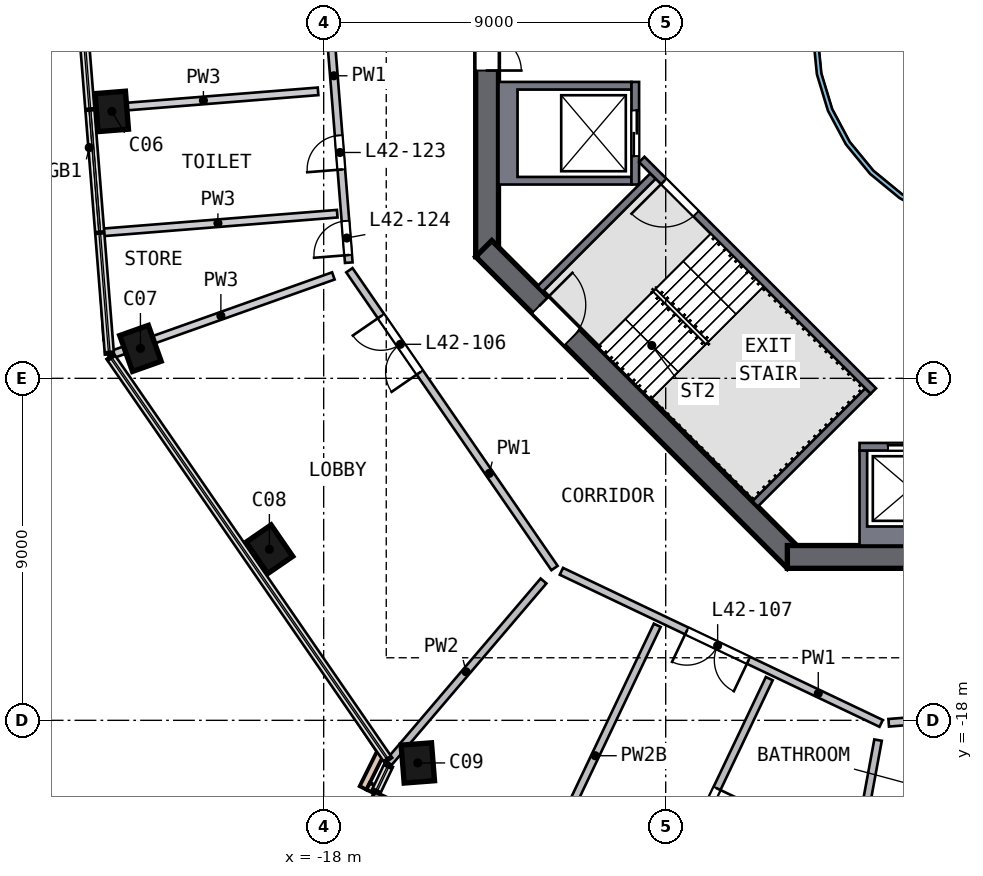
"""IFC4 building model, lengths in metres.
Left out: names, types, materials, properties, quantities, classifications, styles, units other than length and angle.
Written with IfcOpenShell. Run it as: python <this file> out.ifc"""

import sys

from ifc_helpers import new_model, si_unit, direction, frame, frame_2d, origin, origin_2d, place, context, subcontext, project, spatial, polyline, rectangle, outline, extrude, element, fill, save


model = new_model("IFC4")
c1 = context("Model", 3, precision=1e-05, world=origin(), true_north=direction((0.0, 1.0)))
c2 = subcontext(c1, "Body", "Model", "MODEL_VIEW")
j1 = project(units=[si_unit("LENGTHUNIT", "METRE"), si_unit("PLANEANGLEUNIT", "RADIAN")], contexts=[c1])
p1 = place(None, origin())
s1 = spatial("IfcSite", under=j1, at=p1, CompositionType="ELEMENT")
p2 = place(p1, origin())
s2 = spatial("IfcBuilding", under=s1, at=p2, CompositionType="ELEMENT")
p3 = place(p2, frame((0.0, 0.0, 175.0)))
s3 = spatial("IfcBuildingStorey", under=s2, at=p3, CompositionType="ELEMENT", Elevation=175.0)
p4 = place(p3, frame((-23.583, -1.881, 0.0), z_axis=(0.006953716, -0.078722297, 0.996872332), x_axis=(0.079340262, -0.993710224, -0.079026028)))
e1 = element("IfcColumn", 1, at=p4, inside=s3, PredefinedType="COLUMN", context=c2, shape_type="SweptSolid", body=[
    extrude(rectangle(XDim=1.0, YDim=0.8, at=origin_2d()), origin(), (0.0, 0.0, 1.0), 4.705),
])
p5 = place(p3, frame((-22.855, -8.12, 0.0), z_axis=(0.027706677, -0.076115534, 0.996713984), x_axis=(-0.333017196, 0.93943535, 0.080998586)))
e2 = element("IfcColumn", 2, at=p5, inside=s3, PredefinedType="COLUMN", context=c2, shape_type="SweptSolid", body=[
    extrude(rectangle(XDim=1.0, YDim=0.8, at=origin_2d()), origin(), (0.0, 0.0, 1.0), 4.705),
])
p6 = place(p3, frame((-19.483, -13.421, 0.0), z_axis=(0.045354859, -0.064711109, 0.996872815), x_axis=(0.565250312, -0.821126017, -0.079019933)))
e3 = element("IfcColumn", 3, at=p6, inside=s3, PredefinedType="COLUMN", context=c2, shape_type="SweptSolid", body=[
    extrude(rectangle(XDim=1.0, YDim=0.8, at=origin_2d()), origin(), (0.0, 0.0, 1.0), 4.705),
])
p7 = place(p3, frame((-15.6, -19.059, 0.0), z_axis=(0.064071621, -0.051568576, 0.996612015), x_axis=(-0.075850249, 0.995523512, 0.056388622)))
e4 = element("IfcColumn", 4, at=p7, inside=s3, PredefinedType="COLUMN", context=c2, shape_type="SweptSolid", body=[
    extrude(rectangle(XDim=1.0, YDim=0.8, at=origin_2d()), origin(), (0.0, 0.0, 1.0), 4.706),
])
p8 = place(p3, frame((-13.7, 5.799, 0.0), z_axis=(0.0, 0.0, 1.0), x_axis=(0.0, -1.0, 0.0)))
e5 = element("IfcWall", 5, at=p8, inside=s3, PredefinedType="SHEAR", context=c2, shape_type="SweptSolid", body=[
    extrude(rectangle(XDim=11.598, YDim=0.6, at=frame_2d((5.799, 0.0))), origin(), (0.0, 0.0, 1.0), 5.0),
])
p9 = place(p8, frame((4.899, 0.0, 0.0)))
e6 = element("IfcOpeningElement", 6, at=p9, cuts=e5, PredefinedType="OPENING", context=c2, shape_type="SweptSolid", body=[
    extrude(rectangle(XDim=1.8, YDim=2.1, at=frame_2d((0.9, 1.05))), frame((0.0, 0.31, 0.0), z_axis=(0.0, -1.0, 0.0), x_axis=(1.0, 0.0, 0.0)), (0.0, 0.0, 1.0), 0.62),
])
p10 = place(p3, frame((-13.788, -5.587, 0.0), z_axis=(0.0, 0.0, 1.0), x_axis=(0.707106781, -0.707106781, 0.0)))
e7 = element("IfcWall", 7, at=p10, inside=s3, PredefinedType="SHEAR", context=c2, shape_type="SweptSolid", body=[
    extrude(rectangle(XDim=11.598, YDim=0.6, at=frame_2d((5.799, 0.0))), origin(), (0.0, 0.0, 1.0), 5.0),
])
p11 = place(p10, frame((2.099, 0.0, 0.0)))
e8 = element("IfcOpeningElement", 8, at=p11, cuts=e7, PredefinedType="OPENING", context=c2, shape_type="SweptSolid", body=[
    extrude(rectangle(XDim=1.2, YDim=2.1, at=frame_2d((0.6, 1.05))), frame((0.0, 0.31, 0.0), z_axis=(0.0, -1.0, 0.0), x_axis=(1.0, 0.0, 0.0)), (0.0, 0.0, 1.0), 0.62),
])
p12 = place(p3, frame((-5.799, -13.7, 0.0), z_axis=(0.0, 0.0, 1.0), x_axis=(1.0, 0.0, 0.0)))
e9 = element("IfcWall", 9, at=p12, inside=s3, PredefinedType="SHEAR", context=c2, shape_type="SweptSolid", body=[
    extrude(rectangle(XDim=11.598, YDim=0.6, at=frame_2d((5.799, 0.0))), origin(), (0.0, 0.0, 1.0), 5.0),
])
p13 = place(p12, frame((4.899, 0.0, 0.0)))
e10 = element("IfcOpeningElement", 10, at=p13, cuts=e9, PredefinedType="OPENING", context=c2, shape_type="SweptSolid", body=[
    extrude(rectangle(XDim=1.8, YDim=2.1, at=frame_2d((0.9, 1.05))), frame((0.0, 0.31, 0.0), z_axis=(0.0, -1.0, 0.0), x_axis=(1.0, 0.0, 0.0)), (0.0, 0.0, 1.0), 0.62),
])
p14 = place(p3, frame((-16.688, -19.949, 0.0), z_axis=(0.0, 0.0, 1.0), x_axis=(0.903055362, -0.42952417, 0.0)))
e11 = element("IfcWall", 11, at=p14, inside=s3, PredefinedType="SOLIDWALL", context=c2, shape_type="SweptSolid", body=[
    extrude(rectangle(XDim=1.875, YDim=0.15, at=frame_2d((0.938, 0.0))), origin(), (0.0, 0.0, 1.0), 4.69),
])
p15 = place(p3, frame((-16.497, -18.838, 0.0), z_axis=(0.0, 0.0, 1.0), x_axis=(-0.444699929, -0.895679615, 0.0)))
e12 = element("IfcWall", 12, at=p15, inside=s3, PredefinedType="PARAPET", context=c2, shape_type="SweptSolid", body=[
    extrude(rectangle(XDim=1.05, YDim=0.2, at=frame_2d((0.525, 0.0))), origin(), (0.0, 0.0, 1.0), 1.1),
])
p16 = place(p3, frame((-16.829, -19.733, 0.0), z_axis=(0.0, 0.0, 1.0), x_axis=(0.895756847, -0.444544341, 0.0)))
e13 = element("IfcWall", 13, at=p16, inside=s3, PredefinedType="PARAPET", context=c2, shape_type="SweptSolid", body=[
    extrude(rectangle(XDim=0.22, YDim=0.2, at=frame_2d((0.11, 0.0))), origin(), (0.0, 0.0, 1.0), 1.1),
])
p17 = place(p3, origin())
e14 = element("IfcWall", 14, at=p17, inside=s3, PredefinedType="SOLIDWALL", context=c2, shape_type="SweptSolid", body=[
    extrude(outline(polyline([(-13.4, -3.9), (-13.4, -1.2), (-9.9, -1.2), (-9.9, -1.4), (-12.9, -1.4), (-12.9, -3.7), (-9.9, -3.7), (-9.9, -3.9), (-13.4, -3.9)])), origin(), (0.0, 0.0, 1.0), 4.69),
])
p18 = place(p3, frame((-9.8, -1.2, 0.0), z_axis=(0.0, 0.0, 1.0), x_axis=(0.0, -1.0, 0.0)))
e15 = element("IfcWall", 15, at=p18, inside=s3, PredefinedType="SOLIDWALL", context=c2, shape_type="SweptSolid", body=[
    extrude(rectangle(XDim=2.7, YDim=0.2, at=frame_2d((1.35, 0.0))), origin(), (0.0, 0.0, 1.0), 4.69),
])
p19 = place(p18, frame((0.75, 0.0, 0.0)))
e16 = element("IfcOpeningElement", 16, at=p19, cuts=e15, PredefinedType="OPENING", context=c2, shape_type="SweptSolid", body=[
    extrude(rectangle(XDim=1.2, YDim=2.1, at=frame_2d((0.6, 1.05))), frame((0.0, 0.11, 0.0), z_axis=(0.0, -1.0, 0.0), x_axis=(1.0, 0.0, 0.0)), (0.0, 0.0, 1.0), 0.22),
])
p20 = place(p3, origin())
e17 = element("IfcWall", 17, at=p20, inside=s3, PredefinedType="SOLIDWALL", context=c2, shape_type="SweptSolid", body=[
    extrude(outline(polyline([(-3.9, -13.4), (-3.9, -10.9), (-3.7, -10.9), (-3.7, -12.9), (-1.4, -12.9), (-1.4, -10.9), (-1.2, -10.9), (-1.2, -13.4), (-3.9, -13.4)])), origin(), (0.0, 0.0, 1.0), 4.69),
])
p21 = place(p3, frame((-1.2, -10.8, 0.0), z_axis=(0.0, 0.0, 1.0), x_axis=(-1.0, 0.0, 0.0)))
e18 = element("IfcWall", 18, at=p21, inside=s3, PredefinedType="SOLIDWALL", context=c2, shape_type="SweptSolid", body=[
    extrude(rectangle(XDim=2.7, YDim=0.2, at=frame_2d((1.35, 0.0))), origin(), (0.0, 0.0, 1.0), 4.69),
])
p22 = place(p21, frame((0.75, 0.0, 0.0)))
e19 = element("IfcOpeningElement", 19, at=p22, cuts=e18, PredefinedType="OPENING", context=c2, shape_type="SweptSolid", body=[
    extrude(rectangle(XDim=1.2, YDim=2.1, at=frame_2d((0.6, 1.05))), frame((0.0, 0.11, 0.0), z_axis=(0.0, -1.0, 0.0), x_axis=(1.0, 0.0, 0.0)), (0.0, 0.0, 1.0), 0.22),
])
p23 = place(p3, frame((-3.535, -9.334, 0.0), z_axis=(0.0, 0.0, 1.0), x_axis=(-0.707120946, 0.707092617, 0.0)))
e20 = element("IfcWall", 20, at=p23, inside=s3, PredefinedType="SOLIDWALL", context=c2, shape_type="SweptSolid", body=[
    extrude(rectangle(XDim=8.618, YDim=0.2, at=frame_2d((4.309, 0.0))), origin(), (0.0, 0.0, 1.0), 4.69),
])
p24 = place(p23, frame((6.6, 0.0, 0.0)))
e21 = element("IfcOpeningElement", 21, at=p24, cuts=e20, PredefinedType="OPENING", context=c2, shape_type="SweptSolid", body=[
    extrude(rectangle(XDim=1.2, YDim=2.1, at=frame_2d((0.6, 1.05))), frame((0.0, 0.11, 0.0), z_axis=(0.0, -1.0, 0.0), x_axis=(1.0, 0.0, 0.0)), (0.0, 0.0, 1.0), 0.22),
])
for number, where, z_axis, x_axis in (
    (22, (-9.334, -3.677, 0.0), (0.0, 0.0, 1.0), (-0.707, -0.707, 0.0)),
    (23, (-3.677, -9.334, 0.0), (0.0, 0.0, 1.0), (-0.707, -0.707, 0.0)),
):
    element("IfcWall", number, at=place(p3, frame(where, z_axis=z_axis, x_axis=x_axis)), inside=s3, PredefinedType="SOLIDWALL", context=c2, shape_type="SweptSolid", body=[
        extrude(rectangle(XDim=4.2, YDim=0.2, at=frame_2d((2.1, 0.0))), origin(), (0.0, 0.0, 1.0), 4.69),
    ])
p25 = place(p3, origin())
e24 = element("IfcWall", 24, at=p25, inside=s3, PredefinedType="SOLIDWALL", context=c2, shape_type="SweptSolid", body=[
    extrude(outline(polyline([(5.021, -0.999), (4.73, -1.959), (4.257, -2.844), (3.62, -3.62), (2.844, -4.257), (1.959, -4.73), (0.999, -5.021), (0.0, -5.12), (-0.999, -5.021), (-1.959, -4.73), (-2.844, -4.257), (-3.62, -3.62), (-4.257, -2.844), (-4.73, -1.959), (-5.021, -0.999), (-5.12, 0.0), (-5.021, 0.999), (-4.73, 1.959), (-4.257, 2.844), (-3.62, 3.62), (-2.844, 4.257), (-1.959, 4.73), (-0.999, 5.021), (0.0, 5.12), (0.999, 5.021), (1.959, 4.73), (2.844, 4.257), (3.62, 3.62), (4.257, 2.844), (4.73, 1.959), (5.021, 0.999), (5.12, 0.0), (5.021, -0.999)]), holes=[polyline([(4.904, 0.976), (4.619, 1.913), (4.157, 2.778), (3.535, 3.535), (2.778, 4.157), (1.913, 4.619), (0.976, 4.904), (0.0, 5.0), (-0.976, 4.904), (-1.913, 4.619), (-2.778, 4.157), (-3.535, 3.535), (-4.157, 2.778), (-4.619, 1.913), (-4.904, 0.976), (-5.0, 0.0), (-4.904, -0.976), (-4.619, -1.913), (-4.157, -2.778), (-3.535, -3.535), (-2.778, -4.157), (-1.913, -4.619), (-0.976, -4.904), (0.0, -5.0), (0.976, -4.904), (1.913, -4.619), (2.778, -4.157), (3.535, -3.535), (4.157, -2.778), (4.619, -1.913), (4.904, -0.976), (5.0, 0.0), (4.904, 0.976)])]), origin(), (0.0, 0.0, 1.0), 4.69),
])
p26 = place(p3, frame((-17.34, -5.956, 0.0), z_axis=(0.0, 0.0, 1.0), x_axis=(-0.079507867, 0.996834238, 0.0)))
e25 = element("IfcWall", 25, at=p26, inside=s3, PredefinedType="SOLIDWALL", context=c2, shape_type="SweptSolid", body=[
    extrude(rectangle(XDim=9.117, YDim=0.2, at=frame_2d((4.558, 0.0))), origin(), (0.0, 0.0, 1.0), 4.69),
])
p27 = place(p26, frame((6.508, 0.0, 0.0)))
e26 = element("IfcOpeningElement", 26, at=p27, cuts=e25, PredefinedType="OPENING", context=c2, shape_type="SweptSolid", body=[
    extrude(rectangle(XDim=0.9, YDim=2.1, at=frame_2d((0.45, 1.05))), frame((0.0, 0.11, 0.0), z_axis=(0.0, -1.0, 0.0), x_axis=(1.0, 0.0, 0.0)), (0.0, 0.0, 1.0), 0.22),
])
p28 = place(p26, frame((2.458, 0.0, 0.0)))
e27 = element("IfcOpeningElement", 27, at=p28, cuts=e25, PredefinedType="OPENING", context=c2, shape_type="SweptSolid", body=[
    extrude(rectangle(XDim=0.9, YDim=2.1, at=frame_2d((0.45, 1.05))), frame((0.0, 0.11, 0.0), z_axis=(0.0, -1.0, 0.0), x_axis=(1.0, 0.0, 0.0)), (0.0, 0.0, 1.0), 0.22),
])
p29 = place(p26, frame((0.2, 0.0, 0.0)))
e28 = element("IfcOpeningElement", 28, at=p29, cuts=e25, PredefinedType="OPENING", context=c2, shape_type="SweptSolid", body=[
    extrude(rectangle(XDim=0.9, YDim=2.1, at=frame_2d((0.45, 1.05))), frame((0.0, 0.11, 0.0), z_axis=(0.0, -1.0, 0.0), x_axis=(1.0, 0.0, 0.0)), (0.0, 0.0, 1.0), 0.22),
])
p30 = place(p3, frame((-11.925, -13.992, 0.0), z_axis=(0.0, 0.0, 1.0), x_axis=(-0.567282038, 0.823523581, 0.0)))
e29 = element("IfcWall", 29, at=p30, inside=s3, PredefinedType="SOLIDWALL", context=c2, shape_type="SweptSolid", body=[
    extrude(rectangle(XDim=9.516, YDim=0.2, at=frame_2d((4.758, 0.0))), origin(), (0.0, 0.0, 1.0), 4.69),
])
p31 = place(p30, frame((6.25, 0.0, 0.0)))
e30 = element("IfcOpeningElement", 30, at=p31, cuts=e29, PredefinedType="OPENING", context=c2, shape_type="SweptSolid", body=[
    extrude(rectangle(XDim=1.8, YDim=2.1, at=frame_2d((0.9, 1.05))), frame((0.0, 0.11, 0.0), z_axis=(0.0, -1.0, 0.0), x_axis=(1.0, 0.0, 0.0)), (0.0, 0.0, 1.0), 0.22),
])
p32 = place(p3, frame((-3.331, -18.08, 0.0), z_axis=(0.0, 0.0, 1.0), x_axis=(-0.903043531, 0.429549043, 0.0)))
e31 = element("IfcWall", 31, at=p32, inside=s3, PredefinedType="SOLIDWALL", context=c2, shape_type="SweptSolid", body=[
    extrude(rectangle(XDim=9.317, YDim=0.2, at=frame_2d((4.658, 0.0))), origin(), (0.0, 0.0, 1.0), 4.69),
])
p33 = place(p32, frame((3.864, 0.0, 0.0)))
e32 = element("IfcOpeningElement", 32, at=p33, cuts=e31, PredefinedType="OPENING", context=c2, shape_type="SweptSolid", body=[
    extrude(rectangle(XDim=1.8, YDim=2.1, at=frame_2d((0.9, 1.05))), frame((0.0, 0.11, 0.0), z_axis=(0.0, -1.0, 0.0), x_axis=(1.0, 0.0, 0.0)), (0.0, 0.0, 1.0), 0.22),
])
p34 = place(p3, frame((6.155, -17.324, 0.0), z_axis=(0.0, 0.0, 1.0), x_axis=(-0.996834414, -0.079505668, 0.0)))
e33 = element("IfcWall", 33, at=p34, inside=s3, PredefinedType="SOLIDWALL", context=c2, shape_type="SweptSolid", body=[
    extrude(rectangle(XDim=9.317, YDim=0.2, at=frame_2d((4.658, 0.0))), origin(), (0.0, 0.0, 1.0), 4.69),
])
p35 = place(p34, frame((5.15, 0.0, 0.0)))
e34 = element("IfcOpeningElement", 34, at=p35, cuts=e33, PredefinedType="OPENING", context=c2, shape_type="SweptSolid", body=[
    extrude(rectangle(XDim=1.0, YDim=2.1, at=frame_2d((0.5, 1.05))), frame((0.0, 0.11, 0.0), z_axis=(0.0, -1.0, 0.0), x_axis=(1.0, 0.0, 0.0)), (0.0, 0.0, 1.0), 0.22),
])
p36 = place(p3, frame((-16.29, -19.114, 0.0), z_axis=(0.0, 0.0, 1.0), x_axis=(0.648654107, 0.76108334, 0.0)))
e35 = element("IfcWall", 35, at=p36, inside=s3, PredefinedType="SOLIDWALL", context=c2, shape_type="SweptSolid", body=[
    extrude(rectangle(XDim=6.282, YDim=0.2, at=frame_2d((3.141, 0.0))), origin(), (0.0, 0.0, 1.0), 4.69),
])
p37 = place(p3, frame((-13.905, -25.343, 0.0), z_axis=(0.0, 0.0, 1.0), x_axis=(0.429567521, 0.903034742, 0.0)))
e36 = element("IfcWall", 36, at=p37, inside=s3, PredefinedType="SOLIDWALL", context=c2, shape_type="SweptSolid", body=[
    extrude(rectangle(XDim=10.9, YDim=0.2, at=frame_2d((5.45, 0.0))), origin(), (0.0, 0.0, 1.0), 4.19),
])
p38 = place(p37, frame((2.1, 0.0, 0.0)))
e37 = element("IfcOpeningElement", 37, at=p38, cuts=e36, PredefinedType="OPENING", context=c2, shape_type="SweptSolid", body=[
    extrude(rectangle(XDim=1.0, YDim=2.1, at=frame_2d((0.5, 1.05))), frame((0.0, 0.11, 0.0), z_axis=(0.0, -1.0, 0.0), x_axis=(1.0, 0.0, 0.0)), (0.0, 0.0, 1.0), 0.22),
])
p39 = place(p3, frame((-6.274, -16.902, 0.0), z_axis=(0.0, 0.0, 1.0), x_axis=(-0.429567521, -0.903034742, 0.0)))
e38 = element("IfcWall", 38, at=p39, inside=s3, PredefinedType="SOLIDWALL", context=c2, shape_type="SweptSolid", body=[
    extrude(rectangle(XDim=10.9, YDim=0.2, at=frame_2d((5.45, 0.0))), origin(), (0.0, 0.0, 1.0), 4.69),
])
p40 = place(p39, frame((3.2, 0.0, 0.0)))
e39 = element("IfcOpeningElement", 39, at=p40, cuts=e38, PredefinedType="OPENING", context=c2, shape_type="SweptSolid", body=[
    extrude(rectangle(XDim=1.0, YDim=2.1, at=frame_2d((0.5, 1.05))), frame((0.0, 0.11, 0.0), z_axis=(0.0, -1.0, 0.0), x_axis=(1.0, 0.0, 0.0)), (0.0, 0.0, 1.0), 0.22),
])
p41 = place(p3, frame((-3.413, -18.52, 0.0), z_axis=(0.0, 0.0, 1.0), x_axis=(-0.181207626, -0.983444862, 0.0)))
e40 = element("IfcWall", 40, at=p41, inside=s3, PredefinedType="SOLIDWALL", context=c2, shape_type="SweptSolid", body=[
    extrude(rectangle(XDim=3.025, YDim=0.2, at=frame_2d((1.512, 0.0))), origin(), (0.0, 0.0, 1.0), 4.69),
])
p42 = place(p3, frame((-18.148, -1.448, 0.0), z_axis=(0.0, 0.0, 1.0), x_axis=(-0.996834616, -0.079503137, 0.0)))
e41 = element("IfcWall", 41, at=p42, inside=s3, PredefinedType="SOLIDWALL", context=c2, shape_type="SweptSolid", body=[
    extrude(rectangle(XDim=6.052, YDim=0.2, at=frame_2d((3.026, 0.0))), origin(), (0.0, 0.0, 1.0), 4.69),
])
p43 = place(p3, frame((-17.643, -4.667, 0.0), z_axis=(0.0, 0.0, 1.0), x_axis=(-0.996836314, -0.079481837, 0.0)))
e42 = element("IfcWall", 42, at=p43, inside=s3, PredefinedType="SOLIDWALL", context=c2, shape_type="SweptSolid", body=[
    extrude(rectangle(XDim=6.3, YDim=0.2, at=frame_2d((3.15, 0.0))), origin(), (0.0, 0.0, 1.0), 4.69),
])
p44 = place(p3, frame((-23.665, -8.408, 0.0), z_axis=(0.0, 0.0, 1.0), x_axis=(0.94229808, 0.334775042, 0.0)))
e43 = element("IfcWall", 43, at=p44, inside=s3, PredefinedType="SOLIDWALL", context=c2, shape_type="SweptSolid", body=[
    extrude(rectangle(XDim=6.282, YDim=0.2, at=frame_2d((3.141, 0.0))), origin(), (0.0, 0.0, 1.0), 4.69),
])
p45 = place(p19, origin())
e44 = element("IfcDoor", 44, at=p45, inside=s3, OperationType="DOUBLE_DOOR_SLIDING", PredefinedType="DOOR", context=c2, shape_type="SweptSolid", body=[
    extrude(rectangle(XDim=1.2, YDim=2.1, at=frame_2d((0.6, 1.05))), frame((0.0, 0.025, 0.0), z_axis=(0.0, -1.0, 0.0), x_axis=(1.0, 0.0, 0.0)), (0.0, 0.0, 1.0), 0.05),
])
fill(e16, e44)
p46 = place(p22, origin())
e45 = element("IfcDoor", 45, at=p46, inside=s3, OperationType="DOUBLE_DOOR_SLIDING", PredefinedType="DOOR", context=c2, shape_type="SweptSolid", body=[
    extrude(rectangle(XDim=1.2, YDim=2.1, at=frame_2d((0.6, 1.05))), frame((0.0, 0.025, 0.0), z_axis=(0.0, -1.0, 0.0), x_axis=(1.0, 0.0, 0.0)), (0.0, 0.0, 1.0), 0.05),
])
fill(e19, e45)
p47 = place(p24, origin())
e46 = element("IfcDoor", 46, at=p47, inside=s3, OperationType="SINGLE_SWING_RIGHT", PredefinedType="DOOR", context=c2, shape_type="SweptSolid", body=[
    extrude(rectangle(XDim=1.2, YDim=2.1, at=frame_2d((0.6, 1.05))), frame((0.0, 0.025, 0.0), z_axis=(0.0, -1.0, 0.0), x_axis=(1.0, 0.0, 0.0)), (0.0, 0.0, 1.0), 0.05),
])
fill(e21, e46)
p48 = place(p9, origin())
e47 = element("IfcDoor", 47, at=p48, inside=s3, OperationType="DOUBLE_DOOR_SINGLE_SWING", PredefinedType="DOOR", context=c2, shape_type="SweptSolid", body=[
    extrude(rectangle(XDim=1.8, YDim=2.1, at=frame_2d((0.9, 1.05))), frame((0.0, 0.025, 0.0), z_axis=(0.0, -1.0, 0.0), x_axis=(1.0, 0.0, 0.0)), (0.0, 0.0, 1.0), 0.05),
])
fill(e6, e47)
p49 = place(p11, origin())
e48 = element("IfcDoor", 48, at=p49, inside=s3, OperationType="SINGLE_SWING_LEFT", PredefinedType="DOOR", context=c2, shape_type="SweptSolid", body=[
    extrude(rectangle(XDim=1.2, YDim=2.1, at=frame_2d((0.6, 1.05))), frame((0.0, 0.025, 0.0), z_axis=(0.0, -1.0, 0.0), x_axis=(1.0, 0.0, 0.0)), (0.0, 0.0, 1.0), 0.05),
])
fill(e8, e48)
p50 = place(p31, origin())
e49 = element("IfcDoor", 49, at=p50, inside=s3, OperationType="DOUBLE_DOOR_SINGLE_SWING", PredefinedType="DOOR", context=c2, shape_type="SweptSolid", body=[
    extrude(rectangle(XDim=1.8, YDim=2.1, at=frame_2d((0.9, 1.05))), frame((0.0, 0.025, 0.0), z_axis=(0.0, -1.0, 0.0), x_axis=(1.0, 0.0, 0.0)), (0.0, 0.0, 1.0), 0.05),
])
fill(e30, e49)
p51 = place(p33, origin())
e50 = element("IfcDoor", 50, at=p51, inside=s3, OperationType="DOUBLE_DOOR_SINGLE_SWING", PredefinedType="DOOR", context=c2, shape_type="SweptSolid", body=[
    extrude(rectangle(XDim=1.8, YDim=2.1, at=frame_2d((0.9, 1.05))), frame((0.0, 0.025, 0.0), z_axis=(0.0, -1.0, 0.0), x_axis=(1.0, 0.0, 0.0)), (0.0, 0.0, 1.0), 0.05),
])
fill(e32, e50)
p52 = place(p40, origin())
e51 = element("IfcDoor", 51, at=p52, inside=s3, OperationType="SINGLE_SWING_LEFT", PredefinedType="DOOR", context=c2, shape_type="SweptSolid", body=[
    extrude(rectangle(XDim=1.0, YDim=2.1, at=frame_2d((0.5, 1.05))), frame((0.0, 0.025, 0.0), z_axis=(0.0, -1.0, 0.0), x_axis=(1.0, 0.0, 0.0)), (0.0, 0.0, 1.0), 0.05),
])
fill(e39, e51)
p53 = place(p28, origin())
e52 = element("IfcDoor", 52, at=p53, inside=s3, OperationType="SINGLE_SWING_LEFT", PredefinedType="DOOR", context=c2, shape_type="SweptSolid", body=[
    extrude(rectangle(XDim=0.9, YDim=2.1, at=frame_2d((0.45, 1.05))), frame((0.0, 0.025, 0.0), z_axis=(0.0, -1.0, 0.0), x_axis=(1.0, 0.0, 0.0)), (0.0, 0.0, 1.0), 0.05),
])
fill(e27, e52)
p54 = place(p29, origin())
e53 = element("IfcDoor", 53, at=p54, inside=s3, OperationType="SINGLE_SWING_LEFT", PredefinedType="DOOR", context=c2, shape_type="SweptSolid", body=[
    extrude(rectangle(XDim=0.9, YDim=2.1, at=frame_2d((0.45, 1.05))), frame((0.0, 0.025, 0.0), z_axis=(0.0, -1.0, 0.0), x_axis=(1.0, 0.0, 0.0)), (0.0, 0.0, 1.0), 0.05),
])
fill(e28, e53)
save(model, sys.argv[1])
